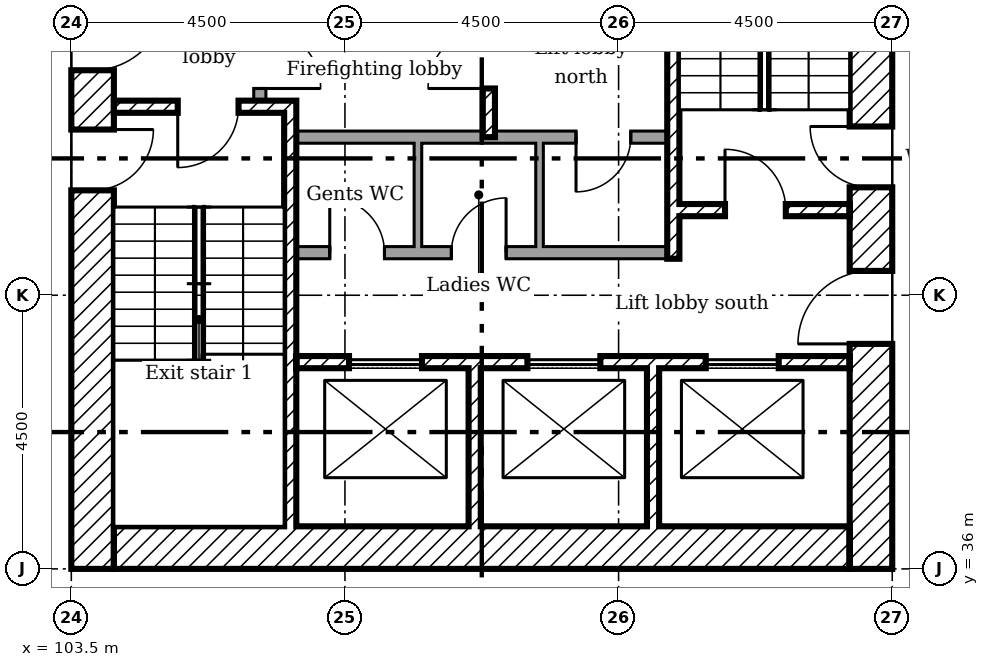
"""IFC4 building model, lengths in metres.
Left out: names, types, materials, properties, quantities, classifications, styles, units other than length and angle.
Written with IfcOpenShell. Run it as: python <this file> out.ifc"""

import sys

from ifc_helpers import new_model, si_unit, direction, frame, frame_2d, origin, place, context, subcontext, project, spatial, rectangle, extrude, element, fill, save


model = new_model("IFC4")
c1 = context("Model", 3, precision=1e-05, world=origin(), true_north=direction((0.0, 1.0)))
c2 = subcontext(c1, "Body", "Model", "MODEL_VIEW")
j1 = project(units=[si_unit("LENGTHUNIT", "METRE"), si_unit("PLANEANGLEUNIT", "RADIAN")], contexts=[c1])
p1 = place(None, origin())
s1 = spatial("IfcSite", under=j1, at=p1, CompositionType="ELEMENT")
p2 = place(p1, origin())
s2 = spatial("IfcBuilding", under=s1, at=p2, CompositionType="ELEMENT")
p3 = place(p2, frame((0.0, 0.0, 120.8)))
s3 = spatial("IfcBuildingStorey", under=s2, at=p3, CompositionType="ELEMENT", Elevation=120.8)
p4 = place(p3, frame((116.65, 36.0, 0.0), z_axis=(0.0, 0.0, 1.0), x_axis=(0.0, 1.0, 0.0)))
e1 = element("IfcWall", 1, at=p4, inside=s3, PredefinedType="SHEAR", context=c2, shape_type="SweptSolid", body=[
    extrude(rectangle(XDim=13.5, YDim=0.7, at=frame_2d((6.75, 0.0))), origin(), (0.0, 0.0, 1.0), 3.35),
])
p5 = place(p4, frame((3.7, 0.0, 0.0)))
e2 = element("IfcOpeningElement", 2, at=p5, cuts=e1, PredefinedType="OPENING", context=c2, shape_type="SweptSolid", body=[
    extrude(rectangle(XDim=1.2, YDim=2.1, at=frame_2d((0.6, 1.05))), frame((0.0, 0.36, 0.0), z_axis=(0.0, -1.0, 0.0), x_axis=(1.0, 0.0, 0.0)), (0.0, 0.0, 1.0), 0.72),
])
p6 = place(p4, frame((6.275, 0.0, 0.0)))
e3 = element("IfcOpeningElement", 3, at=p6, cuts=e1, PredefinedType="OPENING", context=c2, shape_type="SweptSolid", body=[
    extrude(rectangle(XDim=1.0, YDim=2.1, at=frame_2d((0.5, 1.05))), frame((0.0, 0.36, 0.0), z_axis=(0.0, -1.0, 0.0), x_axis=(1.0, 0.0, 0.0)), (0.0, 0.0, 1.0), 0.72),
])
p7 = place(p3, frame((104.2, 36.35, 0.0)))
e4 = element("IfcWall", 4, at=p7, inside=s3, PredefinedType="SHEAR", context=c2, shape_type="SweptSolid", body=[
    extrude(rectangle(XDim=12.1, YDim=0.7, at=frame_2d((6.05, 0.0))), origin(), (0.0, 0.0, 1.0), 3.35),
])
p8 = place(p3, frame((103.85, 36.0, 0.0), z_axis=(0.0, 0.0, 1.0), x_axis=(0.0, 1.0, 0.0)))
e5 = element("IfcWall", 5, at=p8, inside=s3, PredefinedType="SHEAR", context=c2, shape_type="SweptSolid", body=[
    extrude(rectangle(XDim=13.5, YDim=0.7, at=frame_2d((6.75, 0.0))), origin(), (0.0, 0.0, 1.0), 3.35),
])
p9 = place(p8, frame((8.2, 0.0, 0.0)))
e6 = element("IfcOpeningElement", 6, at=p9, cuts=e5, PredefinedType="OPENING", context=c2, shape_type="SweptSolid", body=[
    extrude(rectangle(XDim=1.2, YDim=2.1, at=frame_2d((0.6, 1.05))), frame((0.0, 0.36, 0.0), z_axis=(0.0, -1.0, 0.0), x_axis=(1.0, 0.0, 0.0)), (0.0, 0.0, 1.0), 0.72),
])
p10 = place(p8, frame((6.225, 0.0, 0.0)))
e7 = element("IfcOpeningElement", 7, at=p10, cuts=e5, PredefinedType="OPENING", context=c2, shape_type="SweptSolid", body=[
    extrude(rectangle(XDim=1.0, YDim=2.1, at=frame_2d((0.5, 1.05))), frame((0.0, 0.36, 0.0), z_axis=(0.0, -1.0, 0.0), x_axis=(1.0, 0.0, 0.0)), (0.0, 0.0, 1.0), 0.72),
])
p11 = place(p3, frame((110.367, 48.8, 0.0), z_axis=(0.0, 0.0, 1.0), x_axis=(0.0, -1.0, 0.0)))
e8 = element("IfcWall", 8, at=p11, inside=s3, PredefinedType="SHEAR", context=c2, shape_type="SweptSolid", body=[
    extrude(rectangle(XDim=5.7, YDim=0.2, at=frame_2d((2.85, 0.0))), origin(), (0.0, 0.0, 1.0), 3.35),
])
p12 = place(p11, frame((3.9, 0.0, 0.0)))
e9 = element("IfcOpeningElement", 9, at=p12, cuts=e8, PredefinedType="OPENING", context=c2, shape_type="SweptSolid", body=[
    extrude(rectangle(XDim=1.0, YDim=2.1, at=frame_2d((0.5, 1.05))), frame((0.0, 0.11, 0.0), z_axis=(0.0, -1.0, 0.0), x_axis=(1.0, 0.0, 0.0)), (0.0, 0.0, 1.0), 0.22),
])
for number, where, z_axis, x_axis in (
    (10, (110.133, 36.7, 0.0), (0.0, 0.0, 1.0), (0.0, 1.0, 0.0)),
    (11, (113.067, 36.7, 0.0), (0.0, 0.0, 1.0), (0.0, 1.0, 0.0)),
):
    element("IfcWall", number, at=place(p3, frame(where, z_axis=z_axis, x_axis=x_axis)), inside=s3, PredefinedType="SHEAR", context=c2, shape_type="SweptSolid", body=[
        extrude(rectangle(XDim=2.6, YDim=0.2, at=frame_2d((1.3, 0.0))), origin(), (0.0, 0.0, 1.0), 3.35),
    ])
p13 = place(p3, frame((106.6, 43.7, 0.0), z_axis=(0.0, 0.0, 1.0), x_axis=(0.0, 1.0, 0.0)))
e12 = element("IfcWall", 12, at=p13, inside=s3, PredefinedType="PARTITIONING", context=c2, shape_type="SweptSolid", body=[
    extrude(rectangle(XDim=1.5, YDim=0.2, at=frame_2d((0.75, 0.0))), origin(), (0.0, 0.0, 1.0), 3.35),
])
p14 = place(p13, frame((0.2, 0.0, 0.0)))
e13 = element("IfcOpeningElement", 13, at=p14, cuts=e12, PredefinedType="OPENING", context=c2, shape_type="SweptSolid", body=[
    extrude(rectangle(XDim=1.0, YDim=2.1, at=frame_2d((0.5, 1.05))), frame((0.0, 0.11, 0.0), z_axis=(0.0, -1.0, 0.0), x_axis=(1.0, 0.0, 0.0)), (0.0, 0.0, 1.0), 0.22),
])
p15 = place(p3, frame((107.2, 39.4, 0.0)))
e14 = element("IfcWall", 14, at=p15, inside=s3, PredefinedType="SHEAR", context=c2, shape_type="SweptSolid", body=[
    extrude(rectangle(XDim=9.1, YDim=0.2, at=frame_2d((4.55, 0.0))), origin(), (0.0, 0.0, 1.0), 3.35),
])
p16 = place(p15, frame((0.867, 0.0, 0.0)))
e15 = element("IfcOpeningElement", 15, at=p16, cuts=e14, PredefinedType="OPENING", context=c2, shape_type="SweptSolid", body=[
    extrude(rectangle(XDim=1.2, YDim=2.1, at=frame_2d((0.6, 1.05))), frame((0.0, 0.11, 0.0), z_axis=(0.0, -1.0, 0.0), x_axis=(1.0, 0.0, 0.0)), (0.0, 0.0, 1.0), 0.22),
])
p17 = place(p15, frame((3.8, 0.0, 0.0)))
e16 = element("IfcOpeningElement", 16, at=p17, cuts=e14, PredefinedType="OPENING", context=c2, shape_type="SweptSolid", body=[
    extrude(rectangle(XDim=1.2, YDim=2.1, at=frame_2d((0.6, 1.05))), frame((0.0, 0.11, 0.0), z_axis=(0.0, -1.0, 0.0), x_axis=(1.0, 0.0, 0.0)), (0.0, 0.0, 1.0), 0.22),
])
p18 = place(p15, frame((6.733, 0.0, 0.0)))
e17 = element("IfcOpeningElement", 17, at=p18, cuts=e14, PredefinedType="OPENING", context=c2, shape_type="SweptSolid", body=[
    extrude(rectangle(XDim=1.2, YDim=2.1, at=frame_2d((0.6, 1.05))), frame((0.0, 0.11, 0.0), z_axis=(0.0, -1.0, 0.0), x_axis=(1.0, 0.0, 0.0)), (0.0, 0.0, 1.0), 0.22),
])
p19 = place(p3, frame((107.1, 36.7, 0.0), z_axis=(0.0, 0.0, 1.0), x_axis=(0.0, 1.0, 0.0)))
e18 = element("IfcWall", 18, at=p19, inside=s3, PredefinedType="SHEAR", context=c2, shape_type="SweptSolid", body=[
    extrude(rectangle(XDim=7.0, YDim=0.2, at=frame_2d((3.5, 0.0))), origin(), (0.0, 0.0, 1.0), 3.35),
])
p20 = place(p3, frame((104.2, 43.6, 0.0)))
e19 = element("IfcWall", 19, at=p20, inside=s3, PredefinedType="SHEAR", context=c2, shape_type="SweptSolid", body=[
    extrude(rectangle(XDim=2.8, YDim=0.2, at=frame_2d((1.4, 0.0))), origin(), (0.0, 0.0, 1.0), 3.35),
])
p21 = place(p20, frame((1.05, 0.0, 0.0)))
e20 = element("IfcOpeningElement", 20, at=p21, cuts=e19, PredefinedType="OPENING", context=c2, shape_type="SweptSolid", body=[
    extrude(rectangle(XDim=1.0, YDim=2.1, at=frame_2d((0.5, 1.05))), frame((0.0, 0.11, 0.0), z_axis=(0.0, -1.0, 0.0), x_axis=(1.0, 0.0, 0.0)), (0.0, 0.0, 1.0), 0.22),
])
p22 = place(p3, frame((113.5, 41.9, 0.0)))
e21 = element("IfcWall", 21, at=p22, inside=s3, PredefinedType="SHEAR", context=c2, shape_type="SweptSolid", body=[
    extrude(rectangle(XDim=2.8, YDim=0.2, at=frame_2d((1.4, 0.0))), origin(), (0.0, 0.0, 1.0), 3.35),
])
p23 = place(p22, frame((0.75, 0.0, 0.0)))
e22 = element("IfcOpeningElement", 22, at=p23, cuts=e21, PredefinedType="OPENING", context=c2, shape_type="SweptSolid", body=[
    extrude(rectangle(XDim=1.0, YDim=2.1, at=frame_2d((0.5, 1.05))), frame((0.0, 0.11, 0.0), z_axis=(0.0, -1.0, 0.0), x_axis=(1.0, 0.0, 0.0)), (0.0, 0.0, 1.0), 0.22),
])
p24 = place(p3, frame((113.4, 41.1, 0.0), z_axis=(0.0, 0.0, 1.0), x_axis=(0.0, 1.0, 0.0)))
e23 = element("IfcWall", 23, at=p24, inside=s3, PredefinedType="SHEAR", context=c2, shape_type="SweptSolid", body=[
    extrude(rectangle(XDim=7.7, YDim=0.2, at=frame_2d((3.85, 0.0))), origin(), (0.0, 0.0, 1.0), 3.35),
])
p25 = place(p3, frame((107.2, 43.1, 0.0)))
e24 = element("IfcWall", 24, at=p25, inside=s3, PredefinedType="PARTITIONING", context=c2, shape_type="SweptSolid", body=[
    extrude(rectangle(XDim=6.1, YDim=0.2, at=frame_2d((3.05, 0.0))), origin(), (0.0, 0.0, 1.0), 3.35),
])
p26 = place(p25, frame((4.6, 0.0, 0.0)))
e25 = element("IfcOpeningElement", 25, at=p26, cuts=e24, PredefinedType="OPENING", context=c2, shape_type="SweptSolid", body=[
    extrude(rectangle(XDim=0.9, YDim=2.1, at=frame_2d((0.45, 1.05))), frame((0.0, 0.11, 0.0), z_axis=(0.0, -1.0, 0.0), x_axis=(1.0, 0.0, 0.0)), (0.0, 0.0, 1.0), 0.22),
])
p27 = place(p3, frame((107.2, 41.2, 0.0)))
e26 = element("IfcWall", 26, at=p27, inside=s3, PredefinedType="PARTITIONING", context=c2, shape_type="SweptSolid", body=[
    extrude(rectangle(XDim=6.1, YDim=0.2, at=frame_2d((3.05, 0.0))), origin(), (0.0, 0.0, 1.0), 3.35),
])
p28 = place(p27, frame((0.55, 0.0, 0.0)))
e27 = element("IfcOpeningElement", 27, at=p28, cuts=e26, PredefinedType="OPENING", context=c2, shape_type="SweptSolid", body=[
    extrude(rectangle(XDim=0.9, YDim=2.1, at=frame_2d((0.45, 1.05))), frame((0.0, 0.11, 0.0), z_axis=(0.0, -1.0, 0.0), x_axis=(1.0, 0.0, 0.0)), (0.0, 0.0, 1.0), 0.22),
])
p29 = place(p27, frame((2.55, 0.0, 0.0)))
e28 = element("IfcOpeningElement", 28, at=p29, cuts=e26, PredefinedType="OPENING", context=c2, shape_type="SweptSolid", body=[
    extrude(rectangle(XDim=0.9, YDim=2.1, at=frame_2d((0.45, 1.05))), frame((0.0, 0.11, 0.0), z_axis=(0.0, -1.0, 0.0), x_axis=(1.0, 0.0, 0.0)), (0.0, 0.0, 1.0), 0.22),
])
for number, where, z_axis, x_axis in (
    (29, (109.2, 41.3, 0.0), (0.0, 0.0, 1.0), (0.0, 1.0, 0.0)),
    (30, (111.2, 41.3, 0.0), (0.0, 0.0, 1.0), (0.0, 1.0, 0.0)),
):
    element("IfcWall", number, at=place(p3, frame(where, z_axis=z_axis, x_axis=x_axis)), inside=s3, PredefinedType="PARTITIONING", context=c2, shape_type="SweptSolid", body=[
        extrude(rectangle(XDim=1.7, YDim=0.125, at=frame_2d((0.85, 0.0))), origin(), (0.0, 0.0, 1.0), 3.35),
    ])
p30 = place(p9, frame((1.2, 0.0, 0.0), x_axis=(-1.0, 0.0, 0.0)))
e31 = element("IfcDoor", 31, at=p30, inside=s3, OperationType="SINGLE_SWING_RIGHT", PredefinedType="DOOR", context=c2, shape_type="SweptSolid", body=[
    extrude(rectangle(XDim=1.2, YDim=2.1, at=frame_2d((0.6, 1.05))), frame((0.0, 0.025, 0.0), z_axis=(0.0, -1.0, 0.0), x_axis=(1.0, 0.0, 0.0)), (0.0, 0.0, 1.0), 0.05),
])
fill(e6, e31)
p31 = place(p5, origin())
e32 = element("IfcDoor", 32, at=p31, inside=s3, OperationType="SINGLE_SWING_RIGHT", PredefinedType="DOOR", context=c2, shape_type="SweptSolid", body=[
    extrude(rectangle(XDim=1.2, YDim=2.1, at=frame_2d((0.6, 1.05))), frame((0.0, 0.025, 0.0), z_axis=(0.0, -1.0, 0.0), x_axis=(1.0, 0.0, 0.0)), (0.0, 0.0, 1.0), 0.05),
])
fill(e2, e32)
p32 = place(p21, frame((1.0, 0.0, 0.0), x_axis=(-1.0, 0.0, 0.0)))
e33 = element("IfcDoor", 33, at=p32, inside=s3, OperationType="SINGLE_SWING_LEFT", PredefinedType="DOOR", context=c2, shape_type="SweptSolid", body=[
    extrude(rectangle(XDim=1.0, YDim=2.1, at=frame_2d((0.5, 1.05))), frame((0.0, 0.025, 0.0), z_axis=(0.0, -1.0, 0.0), x_axis=(1.0, 0.0, 0.0)), (0.0, 0.0, 1.0), 0.05),
])
fill(e20, e33)
p33 = place(p10, frame((1.0, 0.0, 0.0), x_axis=(-1.0, 0.0, 0.0)))
e34 = element("IfcDoor", 34, at=p33, inside=s3, OperationType="SINGLE_SWING_RIGHT", PredefinedType="DOOR", context=c2, shape_type="SweptSolid", body=[
    extrude(rectangle(XDim=1.0, YDim=2.1, at=frame_2d((0.5, 1.05))), frame((0.0, 0.025, 0.0), z_axis=(0.0, -1.0, 0.0), x_axis=(1.0, 0.0, 0.0)), (0.0, 0.0, 1.0), 0.05),
])
fill(e7, e34)
p34 = place(p23, origin())
e35 = element("IfcDoor", 35, at=p34, inside=s3, OperationType="SINGLE_SWING_RIGHT", PredefinedType="DOOR", context=c2, shape_type="SweptSolid", body=[
    extrude(rectangle(XDim=1.0, YDim=2.1, at=frame_2d((0.5, 1.05))), frame((0.0, 0.025, 0.0), z_axis=(0.0, -1.0, 0.0), x_axis=(1.0, 0.0, 0.0)), (0.0, 0.0, 1.0), 0.05),
])
fill(e22, e35)
p35 = place(p6, origin())
e36 = element("IfcDoor", 36, at=p35, inside=s3, OperationType="SINGLE_SWING_LEFT", PredefinedType="DOOR", context=c2, shape_type="SweptSolid", body=[
    extrude(rectangle(XDim=1.0, YDim=2.1, at=frame_2d((0.5, 1.05))), frame((0.0, 0.025, 0.0), z_axis=(0.0, -1.0, 0.0), x_axis=(1.0, 0.0, 0.0)), (0.0, 0.0, 1.0), 0.05),
])
fill(e3, e36)
p36 = place(p12, frame((1.0, 0.0, 0.0), x_axis=(-1.0, 0.0, 0.0)))
e37 = element("IfcDoor", 37, at=p36, inside=s3, OperationType="SINGLE_SWING_RIGHT", PredefinedType="DOOR", context=c2, shape_type="SweptSolid", body=[
    extrude(rectangle(XDim=1.0, YDim=2.1, at=frame_2d((0.5, 1.05))), frame((0.0, 0.025, 0.0), z_axis=(0.0, -1.0, 0.0), x_axis=(1.0, 0.0, 0.0)), (0.0, 0.0, 1.0), 0.05),
])
fill(e9, e37)
p37 = place(p14, frame((1.0, 0.0, 0.0), x_axis=(-1.0, 0.0, 0.0)))
e38 = element("IfcDoor", 38, at=p37, inside=s3, OperationType="SINGLE_SWING_LEFT", PredefinedType="DOOR", context=c2, shape_type="SweptSolid", body=[
    extrude(rectangle(XDim=1.0, YDim=2.1, at=frame_2d((0.5, 1.05))), frame((0.0, 0.025, 0.0), z_axis=(0.0, -1.0, 0.0), x_axis=(1.0, 0.0, 0.0)), (0.0, 0.0, 1.0), 0.05),
])
fill(e13, e38)
p38 = place(p28, origin())
e39 = element("IfcDoor", 39, at=p38, inside=s3, OperationType="SINGLE_SWING_RIGHT", PredefinedType="DOOR", context=c2, shape_type="SweptSolid", body=[
    extrude(rectangle(XDim=0.9, YDim=2.1, at=frame_2d((0.45, 1.05))), frame((0.0, 0.025, 0.0), z_axis=(0.0, -1.0, 0.0), x_axis=(1.0, 0.0, 0.0)), (0.0, 0.0, 1.0), 0.05),
])
fill(e27, e39)
p39 = place(p29, origin())
e40 = element("IfcDoor", 40, at=p39, inside=s3, OperationType="SINGLE_SWING_LEFT", PredefinedType="DOOR", context=c2, shape_type="SweptSolid", body=[
    extrude(rectangle(XDim=0.9, YDim=2.1, at=frame_2d((0.45, 1.05))), frame((0.0, 0.025, 0.0), z_axis=(0.0, -1.0, 0.0), x_axis=(1.0, 0.0, 0.0)), (0.0, 0.0, 1.0), 0.05),
])
fill(e28, e40)
p40 = place(p26, frame((0.9, 0.0, 0.0), x_axis=(-1.0, 0.0, 0.0)))
e41 = element("IfcDoor", 41, at=p40, inside=s3, OperationType="SINGLE_SWING_LEFT", PredefinedType="DOOR", context=c2, shape_type="SweptSolid", body=[
    extrude(rectangle(XDim=0.9, YDim=2.1, at=frame_2d((0.45, 1.05))), frame((0.0, 0.025, 0.0), z_axis=(0.0, -1.0, 0.0), x_axis=(1.0, 0.0, 0.0)), (0.0, 0.0, 1.0), 0.05),
])
fill(e25, e41)
p41 = place(p16, origin())
e42 = element("IfcDoor", 42, at=p41, inside=s3, OperationType="SLIDING_TO_LEFT", PredefinedType="DOOR", context=c2, shape_type="SweptSolid", body=[
    extrude(rectangle(XDim=1.2, YDim=2.1, at=frame_2d((0.6, 1.05))), frame((0.0, 0.025, 0.0), z_axis=(0.0, -1.0, 0.0), x_axis=(1.0, 0.0, 0.0)), (0.0, 0.0, 1.0), 0.05),
])
fill(e15, e42)
p42 = place(p17, origin())
e43 = element("IfcDoor", 43, at=p42, inside=s3, OperationType="SLIDING_TO_LEFT", PredefinedType="DOOR", context=c2, shape_type="SweptSolid", body=[
    extrude(rectangle(XDim=1.2, YDim=2.1, at=frame_2d((0.6, 1.05))), frame((0.0, 0.025, 0.0), z_axis=(0.0, -1.0, 0.0), x_axis=(1.0, 0.0, 0.0)), (0.0, 0.0, 1.0), 0.05),
])
fill(e16, e43)
p43 = place(p18, origin())
e44 = element("IfcDoor", 44, at=p43, inside=s3, OperationType="SLIDING_TO_LEFT", PredefinedType="DOOR", context=c2, shape_type="SweptSolid", body=[
    extrude(rectangle(XDim=1.2, YDim=2.1, at=frame_2d((0.6, 1.05))), frame((0.0, 0.025, 0.0), z_axis=(0.0, -1.0, 0.0), x_axis=(1.0, 0.0, 0.0)), (0.0, 0.0, 1.0), 0.05),
])
fill(e17, e44)
save(model, sys.argv[1])
